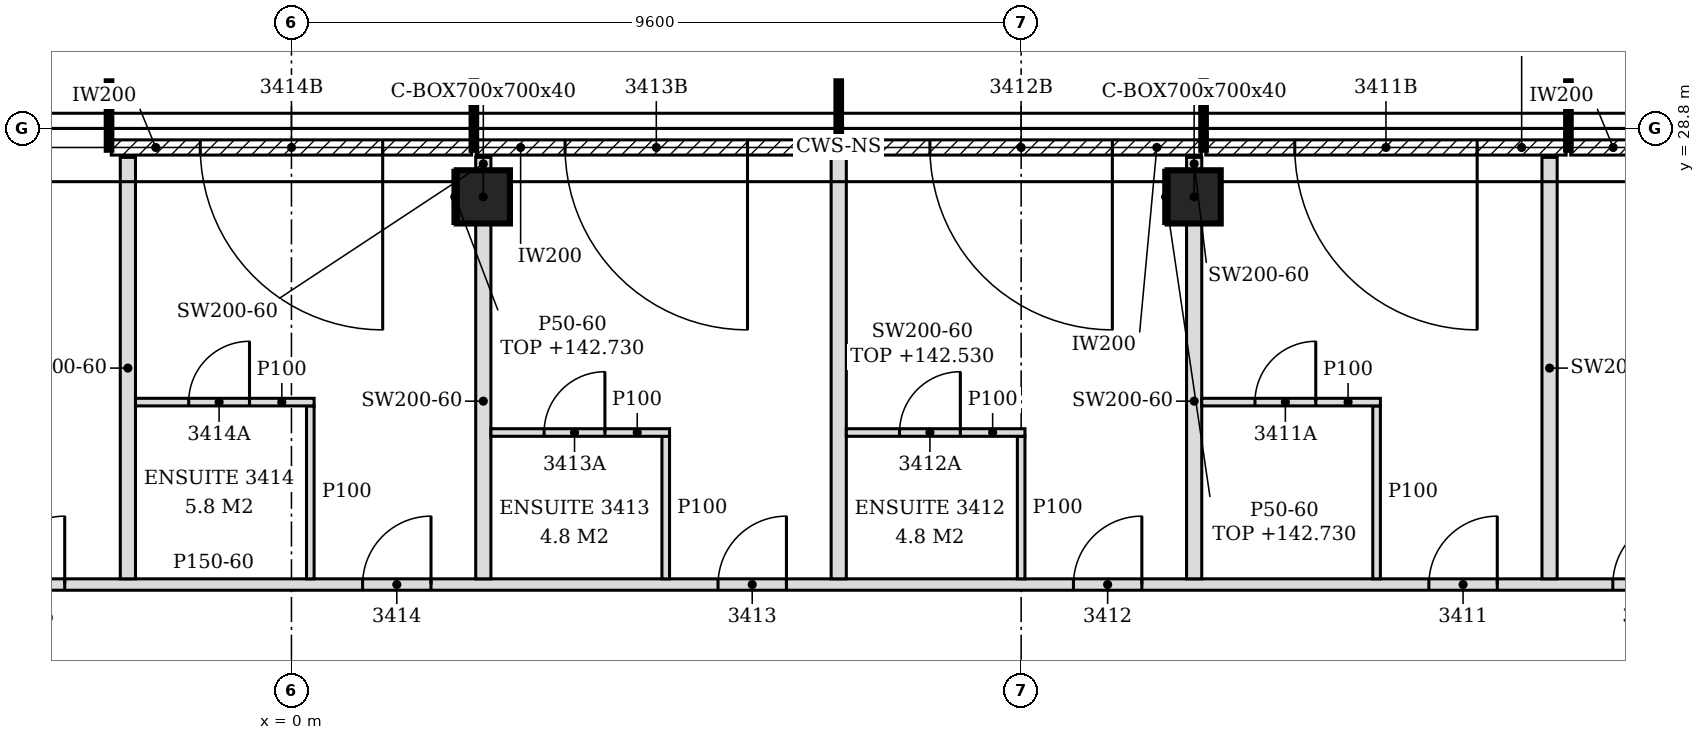
"""IFC4 building model, lengths in metres.
Left out: names, types, materials, properties, quantities, classifications, styles, units other than length and angle.
Written with IfcOpenShell. Run it as: python <this file> out.ifc"""

import sys

from ifc_helpers import new_model, si_unit, direction, frame, frame_2d, origin, origin_2d, place, context, subcontext, project, spatial, polyline, rectangle, hollow_rectangle, outline, extrude, element, fill, save


model = new_model("IFC4")
c1 = context("Model", 3, precision=1e-05, world=origin(), true_north=direction((0.0, 1.0)))
c2 = subcontext(c1, "Body", "Model", "MODEL_VIEW")
j1 = project(units=[si_unit("LENGTHUNIT", "METRE"), si_unit("PLANEANGLEUNIT", "RADIAN")], contexts=[c1])
p1 = place(None, origin())
s1 = spatial("IfcSite", under=j1, at=p1, CompositionType="ELEMENT")
p2 = place(p1, origin())
s2 = spatial("IfcBuilding", under=s1, at=p2, CompositionType="ELEMENT")
p3 = place(p2, frame((0.0, 0.0, 139.8)))
s3 = spatial("IfcBuildingStorey", under=s2, at=p3, CompositionType="ELEMENT", Elevation=139.8)
for number, where, z_axis, x_axis in (
    (1, (11.876, 27.9, -0.15), (0.0, 0.0, 1.0), (1.0, 0.0, 0.0)),
    (2, (2.524, 27.9, -0.15), (0.0, 0.0, 1.0), (1.0, 0.0, 0.0)),
):
    element("IfcColumn", number, at=place(p3, frame(where, z_axis=z_axis, x_axis=x_axis)), inside=s3, PredefinedType="COLUMN", context=c2, shape_type="SweptSolid", body=[
        extrude(hollow_rectangle(XDim=0.7, YDim=0.7, WallThickness=0.04, at=origin_2d()), origin(), (0.0, 0.0, 1.0), 3.6),
    ])
p4 = place(p3, frame((21.457, 28.55, 0.0), z_axis=(0.0, 0.0, 1.0), x_axis=(-1.0, 0.0, 0.0)))
e3 = element("IfcWall", 3, at=p4, inside=s3, PredefinedType="NOTDEFINED", context=c2, shape_type="SweptSolid", body=[
    extrude(rectangle(XDim=4.626, YDim=0.2, at=frame_2d((2.313, 0.0))), origin(), (0.0, 0.0, 1.0), 3.45),
])
p5 = place(p4, frame((1.108, 0.0, 0.0)))
e4 = element("IfcOpeningElement", 4, at=p5, cuts=e3, PredefinedType="OPENING", context=c2, shape_type="SweptSolid", body=[
    extrude(rectangle(XDim=2.4, YDim=2.4, at=frame_2d((1.2, 1.2))), frame((0.0, 0.11, 0.0), z_axis=(0.0, -1.0, 0.0), x_axis=(1.0, 0.0, 0.0)), (0.0, 0.0, 1.0), 0.22),
])
p6 = place(p3, frame((16.77, 28.55, 0.0), z_axis=(0.0, 0.0, 1.0), x_axis=(-1.0, 0.0, 0.0)))
e5 = element("IfcWall", 5, at=p6, inside=s3, PredefinedType="NOTDEFINED", context=c2, shape_type="SweptSolid", body=[
    extrude(rectangle(XDim=4.74, YDim=0.2, at=frame_2d((2.37, 0.0))), origin(), (0.0, 0.0, 1.0), 3.45),
])
p7 = place(p6, frame((1.17, 0.0, 0.0)))
e6 = element("IfcOpeningElement", 6, at=p7, cuts=e5, PredefinedType="OPENING", context=c2, shape_type="SweptSolid", body=[
    extrude(rectangle(XDim=2.4, YDim=2.4, at=frame_2d((1.2, 1.2))), frame((0.0, 0.11, 0.0), z_axis=(0.0, -1.0, 0.0), x_axis=(1.0, 0.0, 0.0)), (0.0, 0.0, 1.0), 0.22),
])
p8 = place(p3, frame((11.97, 28.55, 0.0), z_axis=(0.0, 0.0, 1.0), x_axis=(-1.0, 0.0, 0.0)))
e7 = element("IfcWall", 7, at=p8, inside=s3, PredefinedType="NOTDEFINED", context=c2, shape_type="SweptSolid", body=[
    extrude(rectangle(XDim=4.74, YDim=0.2, at=frame_2d((2.37, 0.0))), origin(), (0.0, 0.0, 1.0), 3.45),
])
p9 = place(p8, frame((1.17, 0.0, 0.0)))
e8 = element("IfcOpeningElement", 8, at=p9, cuts=e7, PredefinedType="OPENING", context=c2, shape_type="SweptSolid", body=[
    extrude(rectangle(XDim=2.4, YDim=2.4, at=frame_2d((1.2, 1.2))), frame((0.0, 0.11, 0.0), z_axis=(0.0, -1.0, 0.0), x_axis=(1.0, 0.0, 0.0)), (0.0, 0.0, 1.0), 0.22),
])
p10 = place(p3, frame((7.17, 28.55, 0.0), z_axis=(0.0, 0.0, 1.0), x_axis=(-1.0, 0.0, 0.0)))
e9 = element("IfcWall", 9, at=p10, inside=s3, PredefinedType="NOTDEFINED", context=c2, shape_type="SweptSolid", body=[
    extrude(rectangle(XDim=4.74, YDim=0.2, at=frame_2d((2.37, 0.0))), origin(), (0.0, 0.0, 1.0), 3.45),
])
p11 = place(p10, frame((1.17, 0.0, 0.0)))
e10 = element("IfcOpeningElement", 10, at=p11, cuts=e9, PredefinedType="OPENING", context=c2, shape_type="SweptSolid", body=[
    extrude(rectangle(XDim=2.4, YDim=2.4, at=frame_2d((1.2, 1.2))), frame((0.0, 0.11, 0.0), z_axis=(0.0, -1.0, 0.0), x_axis=(1.0, 0.0, 0.0)), (0.0, 0.0, 1.0), 0.22),
])
p12 = place(p3, frame((2.37, 28.55, 0.0), z_axis=(0.0, 0.0, 1.0), x_axis=(-1.0, 0.0, 0.0)))
e11 = element("IfcWall", 11, at=p12, inside=s3, PredefinedType="NOTDEFINED", context=c2, shape_type="SweptSolid", body=[
    extrude(rectangle(XDim=4.74, YDim=0.2, at=frame_2d((2.37, 0.0))), origin(), (0.0, 0.0, 1.0), 3.45),
])
p13 = place(p12, frame((1.17, 0.0, 0.0)))
e12 = element("IfcOpeningElement", 12, at=p13, cuts=e11, PredefinedType="OPENING", context=c2, shape_type="SweptSolid", body=[
    extrude(rectangle(XDim=2.4, YDim=2.4, at=frame_2d((1.2, 1.2))), frame((0.0, 0.11, 0.0), z_axis=(0.0, -1.0, 0.0), x_axis=(1.0, 0.0, 0.0)), (0.0, 0.0, 1.0), 0.22),
])
p14 = place(p3, frame((-4.821, 22.8, 0.0), z_axis=(0.0, 0.0, 1.0), x_axis=(1.0, 0.0, 0.0)))
e13 = element("IfcWall", 13, at=p14, inside=s3, PredefinedType="PARTITIONING", context=c2, shape_type="SweptSolid", body=[
    extrude(outline(polyline([(0.0, 0.0), (24.042, 0.0), (24.042, 2.73), (23.871, 2.73), (23.869, 3.45), (12.171, 3.45), (12.169, 2.73), (11.871, 2.73), (11.869, 3.45), (0.171, 3.45), (0.169, 2.73), (0.0, 2.73), (0.0, 0.0)])), frame((0.0, 0.075, 0.0), z_axis=(0.0, -1.0, 0.0), x_axis=(1.0, 0.0, 0.0)), (0.0, 0.0, 1.0), 0.15),
])
p15 = place(p14, frame((22.205, 0.0, 0.0)))
e14 = element("IfcOpeningElement", 14, at=p15, cuts=e13, PredefinedType="OPENING", context=c2, shape_type="SweptSolid", body=[
    extrude(rectangle(XDim=0.9, YDim=2.1, at=frame_2d((0.45, 1.05))), frame((0.0, 0.085, 0.0), z_axis=(0.0, -1.0, 0.0), x_axis=(1.0, 0.0, 0.0)), (0.0, 0.0, 1.0), 0.17),
])
p16 = place(p14, frame((19.785, 0.0, 0.0)))
e15 = element("IfcOpeningElement", 15, at=p16, cuts=e13, PredefinedType="OPENING", context=c2, shape_type="SweptSolid", body=[
    extrude(rectangle(XDim=0.9, YDim=2.1, at=frame_2d((0.45, 1.05))), frame((0.0, 0.085, 0.0), z_axis=(0.0, -1.0, 0.0), x_axis=(1.0, 0.0, 0.0)), (0.0, 0.0, 1.0), 0.17),
])
p17 = place(p14, frame((15.109, 0.0, 0.0)))
e16 = element("IfcOpeningElement", 16, at=p17, cuts=e13, PredefinedType="OPENING", context=c2, shape_type="SweptSolid", body=[
    extrude(rectangle(XDim=0.9, YDim=2.1, at=frame_2d((0.45, 1.05))), frame((0.0, 0.085, 0.0), z_axis=(0.0, -1.0, 0.0), x_axis=(1.0, 0.0, 0.0)), (0.0, 0.0, 1.0), 0.17),
])
p18 = place(p14, frame((10.433, 0.0, 0.0)))
e17 = element("IfcOpeningElement", 17, at=p18, cuts=e13, PredefinedType="OPENING", context=c2, shape_type="SweptSolid", body=[
    extrude(rectangle(XDim=0.9, YDim=2.1, at=frame_2d((0.45, 1.05))), frame((0.0, 0.085, 0.0), z_axis=(0.0, -1.0, 0.0), x_axis=(1.0, 0.0, 0.0)), (0.0, 0.0, 1.0), 0.17),
])
p19 = place(p14, frame((5.757, 0.0, 0.0)))
e18 = element("IfcOpeningElement", 18, at=p19, cuts=e13, PredefinedType="OPENING", context=c2, shape_type="SweptSolid", body=[
    extrude(rectangle(XDim=0.9, YDim=2.1, at=frame_2d((0.45, 1.05))), frame((0.0, 0.085, 0.0), z_axis=(0.0, -1.0, 0.0), x_axis=(1.0, 0.0, 0.0)), (0.0, 0.0, 1.0), 0.17),
])
p20 = place(p14, frame((0.938, 0.0, 0.0)))
e19 = element("IfcOpeningElement", 19, at=p20, cuts=e13, PredefinedType="OPENING", context=c2, shape_type="SweptSolid", body=[
    extrude(rectangle(XDim=0.9, YDim=2.1, at=frame_2d((0.45, 1.05))), frame((0.0, 0.085, 0.0), z_axis=(0.0, -1.0, 0.0), x_axis=(1.0, 0.0, 0.0)), (0.0, 0.0, 1.0), 0.17),
])
p21 = place(p3, frame((-2.152, 22.875, 0.0), z_axis=(0.0, 0.0, 1.0), x_axis=(0.0, 1.0, 0.0)))
e20 = element("IfcWall", 20, at=p21, inside=s3, PredefinedType="PARTITIONING", context=c2, shape_type="SweptSolid", body=[
    extrude(outline(polyline([(0.0, 0.0), (5.545, 0.0), (5.545, 3.45), (5.175, 3.45), (5.173, 2.93), (4.875, 2.93), (4.873, 3.45), (1.23, 3.45), (1.228, 2.88), (1.02, 2.88), (1.018, 3.45), (0.0, 3.45), (0.0, 0.0)])), frame((0.0, 0.1, 0.0), z_axis=(0.0, -1.0, 0.0), x_axis=(1.0, 0.0, 0.0)), (0.0, 0.0, 1.0), 0.2),
])
p22 = place(p3, frame((0.248, 22.875, 0.0), z_axis=(0.0, 0.0, 1.0), x_axis=(0.0, 1.0, 0.0)))
e21 = element("IfcWall", 21, at=p22, inside=s3, PredefinedType="PARTITIONING", context=c2, shape_type="SweptSolid", body=[
    extrude(outline(polyline([(0.0, 0.0), (2.275, 0.0), (2.275, 3.45), (1.23, 3.45), (1.228, 2.88), (1.02, 2.88), (1.018, 3.45), (0.0, 3.45), (0.0, 0.0)])), frame((0.0, 0.05, 0.0), z_axis=(0.0, -1.0, 0.0), x_axis=(1.0, 0.0, 0.0)), (0.0, 0.0, 1.0), 0.1),
])
p23 = place(p3, frame((2.524, 22.875, 0.0), z_axis=(0.0, 0.0, 1.0), x_axis=(0.0, 1.0, 0.0)))
e22 = element("IfcWall", 22, at=p23, inside=s3, PredefinedType="PARTITIONING", context=c2, shape_type="SweptSolid", body=[
    extrude(outline(polyline([(0.0, 0.0), (4.675, 0.0), (4.675, 3.45), (1.23, 3.45), (1.228, 2.88), (1.02, 2.88), (1.018, 3.45), (0.0, 3.45), (0.0, 0.0)])), frame((0.0, 0.1, 0.0), z_axis=(0.0, -1.0, 0.0), x_axis=(1.0, 0.0, 0.0)), (0.0, 0.0, 1.0), 0.2),
])
p24 = place(p3, frame((4.924, 22.875, 0.0), z_axis=(0.0, 0.0, 1.0), x_axis=(0.0, 1.0, 0.0)))
e23 = element("IfcWall", 23, at=p24, inside=s3, PredefinedType="PARTITIONING", context=c2, shape_type="SweptSolid", body=[
    extrude(outline(polyline([(0.0, 0.0), (1.875, 0.0), (1.875, 3.45), (1.23, 3.45), (1.228, 2.88), (1.02, 2.88), (1.018, 3.45), (0.0, 3.45), (0.0, 0.0)])), frame((0.0, 0.05, 0.0), z_axis=(0.0, -1.0, 0.0), x_axis=(1.0, 0.0, 0.0)), (0.0, 0.0, 1.0), 0.1),
])
p25 = place(p3, frame((7.2, 22.875, 0.0), z_axis=(0.0, 0.0, 1.0), x_axis=(0.0, 1.0, 0.0)))
e24 = element("IfcWall", 24, at=p25, inside=s3, PredefinedType="PARTITIONING", context=c2, shape_type="SweptSolid", body=[
    extrude(rectangle(XDim=5.575, YDim=0.2, at=frame_2d((2.788, 0.0))), origin(), (0.0, 0.0, 1.0), 2.73),
])
p26 = place(p3, frame((9.6, 22.875, 0.0), z_axis=(0.0, 0.0, 1.0), x_axis=(0.0, 1.0, 0.0)))
e25 = element("IfcWall", 25, at=p26, inside=s3, PredefinedType="PARTITIONING", context=c2, shape_type="SweptSolid", body=[
    extrude(outline(polyline([(0.0, 0.0), (1.875, 0.0), (1.875, 3.45), (1.23, 3.45), (1.228, 2.88), (1.02, 2.88), (1.018, 3.45), (0.0, 3.45), (0.0, 0.0)])), frame((0.0, 0.05, 0.0), z_axis=(0.0, -1.0, 0.0), x_axis=(1.0, 0.0, 0.0)), (0.0, 0.0, 1.0), 0.1),
])
p27 = place(p3, frame((11.876, 22.875, 0.0), z_axis=(0.0, 0.0, 1.0), x_axis=(0.0, 1.0, 0.0)))
e26 = element("IfcWall", 26, at=p27, inside=s3, PredefinedType="PARTITIONING", context=c2, shape_type="SweptSolid", body=[
    extrude(outline(polyline([(0.0, 0.0), (4.675, 0.0), (4.675, 3.45), (1.23, 3.45), (1.228, 2.88), (1.02, 2.88), (1.018, 3.45), (0.0, 3.45), (0.0, 0.0)])), frame((0.0, 0.1, 0.0), z_axis=(0.0, -1.0, 0.0), x_axis=(1.0, 0.0, 0.0)), (0.0, 0.0, 1.0), 0.2),
])
p28 = place(p3, frame((14.276, 22.875, 0.0), z_axis=(0.0, 0.0, 1.0), x_axis=(0.0, 1.0, 0.0)))
e27 = element("IfcWall", 27, at=p28, inside=s3, PredefinedType="PARTITIONING", context=c2, shape_type="SweptSolid", body=[
    extrude(outline(polyline([(0.0, 0.0), (2.275, 0.0), (2.275, 3.45), (1.23, 3.45), (1.228, 2.88), (1.02, 2.88), (1.018, 3.45), (0.0, 3.45), (0.0, 0.0)])), frame((0.0, 0.05, 0.0), z_axis=(0.0, -1.0, 0.0), x_axis=(1.0, 0.0, 0.0)), (0.0, 0.0, 1.0), 0.1),
])
p29 = place(p3, frame((16.552, 22.875, 0.0), z_axis=(0.0, 0.0, 1.0), x_axis=(0.0, 1.0, 0.0)))
e28 = element("IfcWall", 28, at=p29, inside=s3, PredefinedType="PARTITIONING", context=c2, shape_type="SweptSolid", body=[
    extrude(outline(polyline([(0.0, 0.0), (5.545, 0.0), (5.545, 3.45), (5.175, 3.45), (5.173, 2.93), (4.875, 2.93), (4.873, 3.45), (1.23, 3.45), (1.228, 2.88), (1.02, 2.88), (1.018, 3.45), (0.0, 3.45), (0.0, 0.0)])), frame((0.0, 0.1, 0.0), z_axis=(0.0, -1.0, 0.0), x_axis=(1.0, 0.0, 0.0)), (0.0, 0.0, 1.0), 0.2),
])
p30 = place(p3, frame((2.624, 24.8, 0.0), z_axis=(0.0, 0.0, 1.0), x_axis=(1.0, 0.0, 0.0)))
e29 = element("IfcWall", 29, at=p30, inside=s3, PredefinedType="PARTITIONING", context=c2, shape_type="SweptSolid", body=[
    extrude(rectangle(XDim=2.35, YDim=0.1, at=frame_2d((1.175, 0.0))), origin(), (0.0, 0.0, 1.0), 3.45),
])
p31 = place(p30, frame((0.7, 0.0, 0.0)))
e30 = element("IfcOpeningElement", 30, at=p31, cuts=e29, PredefinedType="OPENING", context=c2, shape_type="SweptSolid", body=[
    extrude(rectangle(XDim=0.8, YDim=2.1, at=frame_2d((0.4, 1.05))), frame((0.0, 0.06, 0.0), z_axis=(0.0, -1.0, 0.0), x_axis=(1.0, 0.0, 0.0)), (0.0, 0.0, 1.0), 0.12),
])
p32 = place(p3, frame((7.3, 24.8, 0.0), z_axis=(0.0, 0.0, 1.0), x_axis=(1.0, 0.0, 0.0)))
e31 = element("IfcWall", 31, at=p32, inside=s3, PredefinedType="PARTITIONING", context=c2, shape_type="SweptSolid", body=[
    extrude(outline(polyline([(0.0, 0.0), (2.35, 0.0), (2.35, 3.45), (0.05, 3.45), (0.048, 2.73), (0.0, 2.73), (0.0, 0.0)])), frame((0.0, 0.05, 0.0), z_axis=(0.0, -1.0, 0.0), x_axis=(1.0, 0.0, 0.0)), (0.0, 0.0, 1.0), 0.1),
])
p33 = place(p32, frame((0.7, 0.0, 0.0)))
e32 = element("IfcOpeningElement", 32, at=p33, cuts=e31, PredefinedType="OPENING", context=c2, shape_type="SweptSolid", body=[
    extrude(rectangle(XDim=0.8, YDim=2.1, at=frame_2d((0.4, 1.05))), frame((0.0, 0.06, 0.0), z_axis=(0.0, -1.0, 0.0), x_axis=(1.0, 0.0, 0.0)), (0.0, 0.0, 1.0), 0.12),
])
p34 = place(p3, frame((-2.052, 25.2, 0.0), z_axis=(0.0, 0.0, 1.0), x_axis=(1.0, 0.0, 0.0)))
e33 = element("IfcWall", 33, at=p34, inside=s3, PredefinedType="PARTITIONING", context=c2, shape_type="SweptSolid", body=[
    extrude(rectangle(XDim=2.35, YDim=0.1, at=frame_2d((1.175, 0.0))), origin(), (0.0, 0.0, 1.0), 3.45),
])
p35 = place(p34, frame((0.7, 0.0, 0.0)))
e34 = element("IfcOpeningElement", 34, at=p35, cuts=e33, PredefinedType="OPENING", context=c2, shape_type="SweptSolid", body=[
    extrude(rectangle(XDim=0.8, YDim=2.1, at=frame_2d((0.4, 1.05))), frame((0.0, 0.06, 0.0), z_axis=(0.0, -1.0, 0.0), x_axis=(1.0, 0.0, 0.0)), (0.0, 0.0, 1.0), 0.12),
])
p36 = place(p3, frame((11.976, 25.2, 0.0), z_axis=(0.0, 0.0, 1.0), x_axis=(1.0, 0.0, 0.0)))
e35 = element("IfcWall", 35, at=p36, inside=s3, PredefinedType="PARTITIONING", context=c2, shape_type="SweptSolid", body=[
    extrude(rectangle(XDim=2.35, YDim=0.1, at=frame_2d((1.175, 0.0))), origin(), (0.0, 0.0, 1.0), 3.45),
])
p37 = place(p36, frame((0.7, 0.0, 0.0)))
e36 = element("IfcOpeningElement", 36, at=p37, cuts=e35, PredefinedType="OPENING", context=c2, shape_type="SweptSolid", body=[
    extrude(rectangle(XDim=0.8, YDim=2.1, at=frame_2d((0.4, 1.05))), frame((0.0, 0.06, 0.0), z_axis=(0.0, -1.0, 0.0), x_axis=(1.0, 0.0, 0.0)), (0.0, 0.0, 1.0), 0.12),
])
for number, where, z_axis, x_axis in (
    (37, (2.524, 28.25, 0.0), (0.0, 0.0, 1.0), (0.0, 1.0, 0.0)),
    (38, (11.876, 28.25, 0.0), (0.0, 0.0, 1.0), (0.0, 1.0, 0.0)),
):
    element("IfcWall", number, at=place(p3, frame(where, z_axis=z_axis, x_axis=x_axis)), inside=s3, PredefinedType="PARTITIONING", context=c2, shape_type="SweptSolid", body=[
        extrude(rectangle(XDim=0.17, YDim=0.2, at=frame_2d((0.085, 0.0))), origin(), (0.0, 0.0, 1.0), 3.45),
    ])
for number, where, z_axis, x_axis in (
    (39, (2.149, 27.55, 0.0), (0.0, 0.0, 1.0), (0.0, 1.0, 0.0)),
    (40, (11.501, 27.55, 0.0), (0.0, 0.0, 1.0), (0.0, 1.0, 0.0)),
):
    element("IfcWall", number, at=place(p3, frame(where, z_axis=z_axis, x_axis=x_axis)), inside=s3, PredefinedType="PARTITIONING", context=c2, shape_type="SweptSolid", body=[
        extrude(rectangle(XDim=0.7, YDim=0.05, at=frame_2d((0.35, 0.0))), origin(), (0.0, 0.0, 1.0), 2.93),
    ])
p38 = place(p7, origin())
e41 = element("IfcDoor", 41, at=p38, inside=s3, OperationType="SINGLE_SWING_LEFT", PredefinedType="DOOR", context=c2, shape_type="SweptSolid", body=[
    extrude(rectangle(XDim=2.4, YDim=2.4, at=frame_2d((1.2, 1.2))), frame((0.0, 0.025, 0.0), z_axis=(0.0, -1.0, 0.0), x_axis=(1.0, 0.0, 0.0)), (0.0, 0.0, 1.0), 0.05),
])
fill(e6, e41)
p39 = place(p9, origin())
e42 = element("IfcDoor", 42, at=p39, inside=s3, OperationType="SINGLE_SWING_LEFT", PredefinedType="DOOR", context=c2, shape_type="SweptSolid", body=[
    extrude(rectangle(XDim=2.4, YDim=2.4, at=frame_2d((1.2, 1.2))), frame((0.0, 0.025, 0.0), z_axis=(0.0, -1.0, 0.0), x_axis=(1.0, 0.0, 0.0)), (0.0, 0.0, 1.0), 0.05),
])
fill(e8, e42)
p40 = place(p11, origin())
e43 = element("IfcDoor", 43, at=p40, inside=s3, OperationType="SINGLE_SWING_LEFT", PredefinedType="DOOR", context=c2, shape_type="SweptSolid", body=[
    extrude(rectangle(XDim=2.4, YDim=2.4, at=frame_2d((1.2, 1.2))), frame((0.0, 0.025, 0.0), z_axis=(0.0, -1.0, 0.0), x_axis=(1.0, 0.0, 0.0)), (0.0, 0.0, 1.0), 0.05),
])
fill(e10, e43)
p41 = place(p13, origin())
e44 = element("IfcDoor", 44, at=p41, inside=s3, OperationType="SINGLE_SWING_LEFT", PredefinedType="DOOR", context=c2, shape_type="SweptSolid", body=[
    extrude(rectangle(XDim=2.4, YDim=2.4, at=frame_2d((1.2, 1.2))), frame((0.0, 0.025, 0.0), z_axis=(0.0, -1.0, 0.0), x_axis=(1.0, 0.0, 0.0)), (0.0, 0.0, 1.0), 0.05),
])
fill(e12, e44)
p42 = place(p15, origin())
e45 = element("IfcDoor", 45, at=p42, inside=s3, OperationType="SINGLE_SWING_RIGHT", PredefinedType="DOOR", context=c2, shape_type="SweptSolid", body=[
    extrude(rectangle(XDim=0.9, YDim=2.1, at=frame_2d((0.45, 1.05))), frame((0.0, 0.025, 0.0), z_axis=(0.0, -1.0, 0.0), x_axis=(1.0, 0.0, 0.0)), (0.0, 0.0, 1.0), 0.05),
])
fill(e14, e45)
p43 = place(p16, origin())
e46 = element("IfcDoor", 46, at=p43, inside=s3, OperationType="SINGLE_SWING_RIGHT", PredefinedType="DOOR", context=c2, shape_type="SweptSolid", body=[
    extrude(rectangle(XDim=0.9, YDim=2.1, at=frame_2d((0.45, 1.05))), frame((0.0, 0.025, 0.0), z_axis=(0.0, -1.0, 0.0), x_axis=(1.0, 0.0, 0.0)), (0.0, 0.0, 1.0), 0.05),
])
fill(e15, e46)
p44 = place(p37, origin())
e47 = element("IfcDoor", 47, at=p44, inside=s3, OperationType="SINGLE_SWING_RIGHT", PredefinedType="DOOR", context=c2, shape_type="SweptSolid", body=[
    extrude(rectangle(XDim=0.8, YDim=2.1, at=frame_2d((0.4, 1.05))), frame((0.0, 0.025, 0.0), z_axis=(0.0, -1.0, 0.0), x_axis=(1.0, 0.0, 0.0)), (0.0, 0.0, 1.0), 0.05),
])
fill(e36, e47)
p45 = place(p17, origin())
e48 = element("IfcDoor", 48, at=p45, inside=s3, OperationType="SINGLE_SWING_RIGHT", PredefinedType="DOOR", context=c2, shape_type="SweptSolid", body=[
    extrude(rectangle(XDim=0.9, YDim=2.1, at=frame_2d((0.45, 1.05))), frame((0.0, 0.025, 0.0), z_axis=(0.0, -1.0, 0.0), x_axis=(1.0, 0.0, 0.0)), (0.0, 0.0, 1.0), 0.05),
])
fill(e16, e48)
p46 = place(p33, origin())
e49 = element("IfcDoor", 49, at=p46, inside=s3, OperationType="SINGLE_SWING_RIGHT", PredefinedType="DOOR", context=c2, shape_type="SweptSolid", body=[
    extrude(rectangle(XDim=0.8, YDim=2.1, at=frame_2d((0.4, 1.05))), frame((0.0, 0.025, 0.0), z_axis=(0.0, -1.0, 0.0), x_axis=(1.0, 0.0, 0.0)), (0.0, 0.0, 1.0), 0.05),
])
fill(e32, e49)
p47 = place(p18, origin())
e50 = element("IfcDoor", 50, at=p47, inside=s3, OperationType="SINGLE_SWING_RIGHT", PredefinedType="DOOR", context=c2, shape_type="SweptSolid", body=[
    extrude(rectangle(XDim=0.9, YDim=2.1, at=frame_2d((0.45, 1.05))), frame((0.0, 0.025, 0.0), z_axis=(0.0, -1.0, 0.0), x_axis=(1.0, 0.0, 0.0)), (0.0, 0.0, 1.0), 0.05),
])
fill(e17, e50)
p48 = place(p31, origin())
e51 = element("IfcDoor", 51, at=p48, inside=s3, OperationType="SINGLE_SWING_RIGHT", PredefinedType="DOOR", context=c2, shape_type="SweptSolid", body=[
    extrude(rectangle(XDim=0.8, YDim=2.1, at=frame_2d((0.4, 1.05))), frame((0.0, 0.025, 0.0), z_axis=(0.0, -1.0, 0.0), x_axis=(1.0, 0.0, 0.0)), (0.0, 0.0, 1.0), 0.05),
])
fill(e30, e51)
p49 = place(p19, origin())
e52 = element("IfcDoor", 52, at=p49, inside=s3, OperationType="SINGLE_SWING_RIGHT", PredefinedType="DOOR", context=c2, shape_type="SweptSolid", body=[
    extrude(rectangle(XDim=0.9, YDim=2.1, at=frame_2d((0.45, 1.05))), frame((0.0, 0.025, 0.0), z_axis=(0.0, -1.0, 0.0), x_axis=(1.0, 0.0, 0.0)), (0.0, 0.0, 1.0), 0.05),
])
fill(e18, e52)
p50 = place(p35, origin())
e53 = element("IfcDoor", 53, at=p50, inside=s3, OperationType="SINGLE_SWING_RIGHT", PredefinedType="DOOR", context=c2, shape_type="SweptSolid", body=[
    extrude(rectangle(XDim=0.8, YDim=2.1, at=frame_2d((0.4, 1.05))), frame((0.0, 0.025, 0.0), z_axis=(0.0, -1.0, 0.0), x_axis=(1.0, 0.0, 0.0)), (0.0, 0.0, 1.0), 0.05),
])
fill(e34, e53)
p51 = place(p20, origin())
e54 = element("IfcDoor", 54, at=p51, inside=s3, OperationType="SINGLE_SWING_RIGHT", PredefinedType="DOOR", context=c2, shape_type="SweptSolid", body=[
    extrude(rectangle(XDim=0.9, YDim=2.1, at=frame_2d((0.45, 1.05))), frame((0.0, 0.025, 0.0), z_axis=(0.0, -1.0, 0.0), x_axis=(1.0, 0.0, 0.0)), (0.0, 0.0, 1.0), 0.05),
])
fill(e19, e54)
save(model, sys.argv[1])
